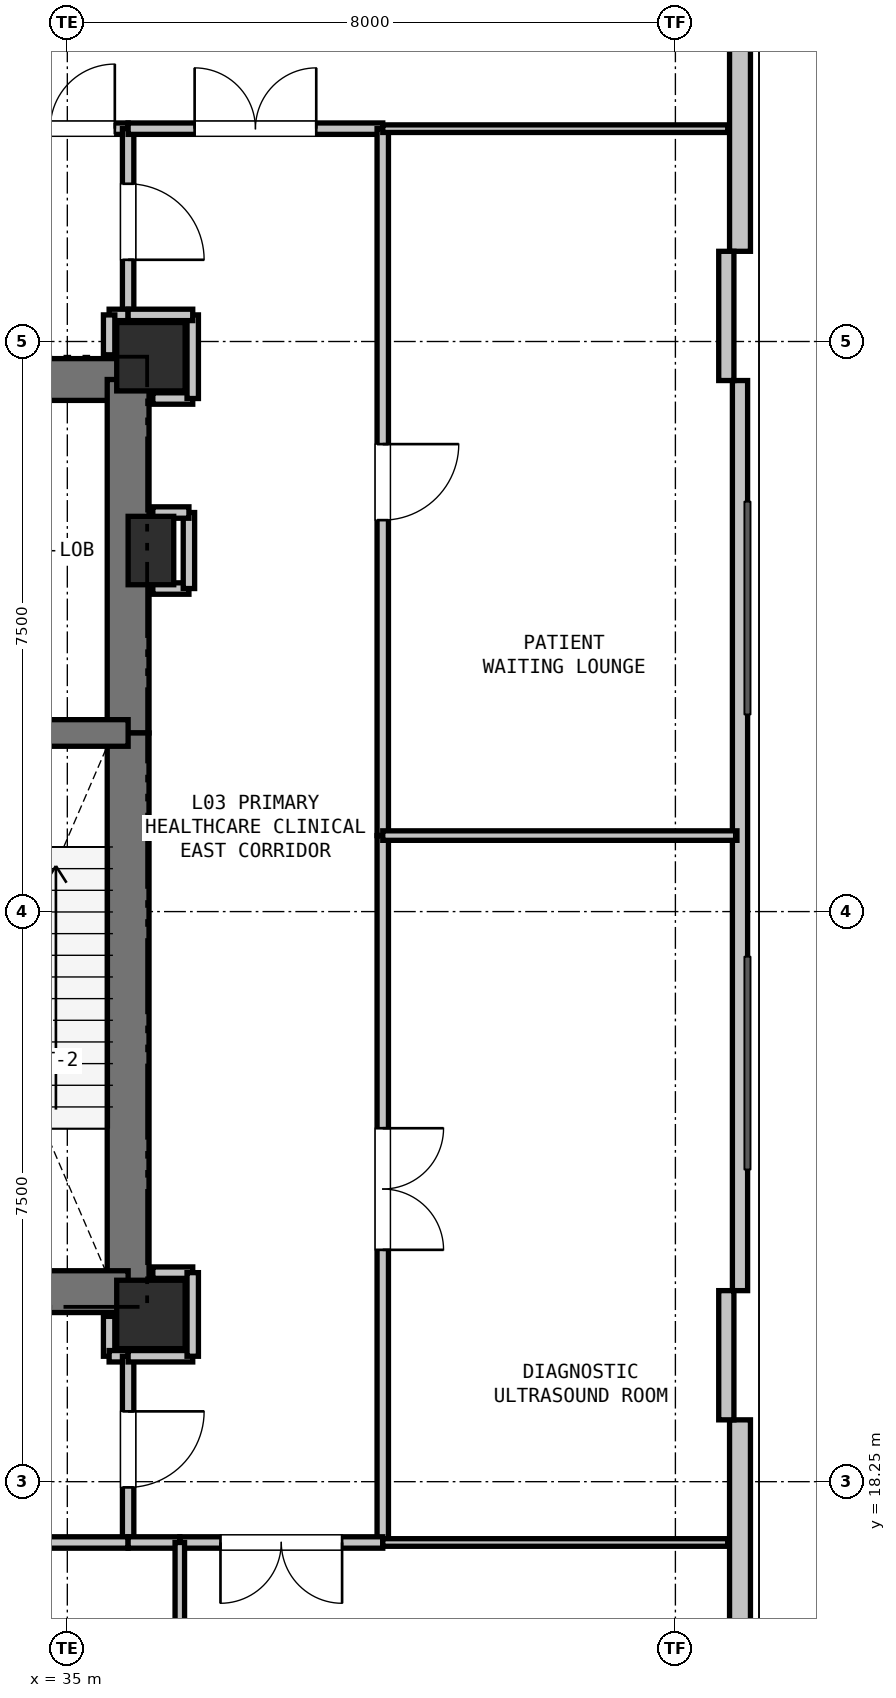
"""IFC4 building model, lengths in metres.
Left out: names, types, materials, properties, quantities, classifications, styles, units other than length and angle.
Written with IfcOpenShell. Run it as: python <this file> out.ifc"""

import sys

from ifc_helpers import new_model, si_unit, direction, frame, frame_2d, origin, origin_2d, place, context, subcontext, project, spatial, rectangle, extrude, element, fill, save


model = new_model("IFC4")
c1 = context("Model", 3, precision=1e-05, world=origin(), true_north=direction((0.0, 1.0)))
c2 = subcontext(c1, "Body", "Model", "MODEL_VIEW")
j1 = project(units=[si_unit("LENGTHUNIT", "METRE"), si_unit("PLANEANGLEUNIT", "RADIAN")], contexts=[c1])
p1 = place(None, origin())
s1 = spatial("IfcSite", under=j1, at=p1, CompositionType="ELEMENT")
p2 = place(p1, origin())
s2 = spatial("IfcBuilding", under=s1, at=p2, CompositionType="ELEMENT")
p3 = place(p2, frame((0.0, 0.0, 14.4)))
s3 = spatial("IfcBuildingStorey", under=s2, at=p3, CompositionType="ELEMENT", Elevation=14.4)
for number, where, z_axis, x_axis in (
    (1, (36.1, 33.05, 0.0), (0.0, 0.0, 1.0), (1.0, 0.0, 0.0)),
    (2, (36.1, 20.45, 0.0), (0.0, 0.0, 1.0), (1.0, 0.0, 0.0)),
):
    element("IfcColumn", number, at=place(p3, frame(where, z_axis=z_axis, x_axis=x_axis)), inside=s3, PredefinedType="COLUMN", context=c2, shape_type="SweptSolid", body=[
        extrude(rectangle(XDim=0.9, YDim=0.9, at=origin_2d()), origin(), (0.0, 0.0, 1.0), 4.8),
    ])
p4 = place(p3, frame((36.1, 30.5, 0.0), z_axis=(0.0, 0.0, 1.0), x_axis=(1.0, 0.0, 0.0)))
e3 = element("IfcColumn", 3, at=p4, inside=s3, PredefinedType="PILASTER", context=c2, shape_type="SweptSolid", body=[
    extrude(rectangle(XDim=0.6, YDim=0.9, at=origin_2d()), origin(), (0.0, 0.0, 1.0), 4.8),
])
p5 = place(p3, frame((43.85, 47.11, 0.0), z_axis=(0.0, 0.0, 1.0), x_axis=(0.0, -1.0, 0.0)))
e4 = element("IfcWall", 4, at=p5, inside=s3, PredefinedType="SOLIDWALL", context=c2, shape_type="SweptSolid", body=[
    extrude(rectangle(XDim=12.673, YDim=0.275, at=frame_2d((6.336, 0.0))), origin(), (0.0, 0.0, 1.0), 4.14),
])
p6 = place(p5, frame((3.1, 0.0, 0.9)))
e5 = element("IfcOpeningElement", 5, at=p6, cuts=e4, PredefinedType="OPENING", context=c2, shape_type="SweptSolid", body=[
    extrude(rectangle(XDim=1.6, YDim=1.8, at=frame_2d((0.8, 0.9))), frame((0.0, 0.147, 0.0), z_axis=(0.0, -1.0, 0.0), x_axis=(1.0, 0.0, 0.0)), (0.0, 0.0, 1.0), 0.295),
])
p7 = place(p3, frame((43.85, 32.737, 0.0), z_axis=(0.0, 0.0, 1.0), x_axis=(0.0, -1.0, 0.0)))
e6 = element("IfcWall", 6, at=p7, inside=s3, PredefinedType="PARAPET", context=c2, shape_type="SweptSolid", body=[
    extrude(rectangle(XDim=11.973, YDim=0.2, at=frame_2d((5.987, 0.0))), origin(), (0.0, 0.0, 1.0), 0.2),
])
p8 = place(p3, frame((43.85, 19.063, 0.0), z_axis=(0.0, 0.0, 1.0), x_axis=(0.0, -1.0, 0.0)))
e7 = element("IfcWall", 7, at=p8, inside=s3, PredefinedType="SOLIDWALL", context=c2, shape_type="SweptSolid", body=[
    extrude(rectangle(XDim=12.673, YDim=0.275, at=frame_2d((6.336, 0.0))), origin(), (0.0, 0.0, 1.0), 4.14),
])
p9 = place(p8, frame((2.988, 0.0, 0.9)))
e8 = element("IfcOpeningElement", 8, at=p9, cuts=e7, PredefinedType="OPENING", context=c2, shape_type="SweptSolid", body=[
    extrude(rectangle(XDim=2.0, YDim=1.8, at=frame_2d((1.0, 0.9))), frame((0.0, 0.147, 0.0), z_axis=(0.0, -1.0, 0.0), x_axis=(1.0, 0.0, 0.0)), (0.0, 0.0, 1.0), 0.295),
])
for number, where, z_axis, x_axis in (
    (9, (43.67, 34.437, 0.0), (0.0, 0.0, 1.0), (0.0, -1.0, 0.0)),
    (10, (43.67, 20.763, 0.0), (0.0, 0.0, 1.0), (0.0, -1.0, 0.0)),
):
    element("IfcWall", number, at=place(p3, frame(where, z_axis=z_axis, x_axis=x_axis)), inside=s3, PredefinedType="PARAPET", context=c2, shape_type="SweptSolid", body=[
        extrude(rectangle(XDim=1.7, YDim=0.2, at=frame_2d((0.85, 0.0))), origin(), (0.0, 0.0, 1.0), 4.14),
    ])
p10 = place(p3, frame((32.35, 32.75, 0.0), z_axis=(0.0, 0.0, 1.0), x_axis=(1.0, 0.0, 0.0)))
e11 = element("IfcWall", 11, at=p10, inside=s3, PredefinedType="SHEAR", context=c2, shape_type="SweptSolid", body=[
    extrude(rectangle(XDim=3.45, YDim=0.55, at=frame_2d((1.725, 0.0))), origin(), (0.0, 0.0, 1.0), 4.52),
])
p11 = place(p10, frame((0.65, 0.0, 0.0)))
e12 = element("IfcOpeningElement", 12, at=p11, cuts=e11, PredefinedType="OPENING", context=c2, shape_type="SweptSolid", body=[
    extrude(rectangle(XDim=1.15, YDim=2.15, at=frame_2d((0.575, 1.075))), frame((0.0, 0.285, 0.0), z_axis=(0.0, -1.0, 0.0), x_axis=(1.0, 0.0, 0.0)), (0.0, 0.0, 1.0), 0.57),
])
p12 = place(p3, frame((35.8, 32.75, 0.0), z_axis=(0.0, 0.0, 1.0), x_axis=(0.0, -1.0, 0.0)))
e13 = element("IfcWall", 13, at=p12, inside=s3, PredefinedType="SHEAR", context=c2, shape_type="SweptSolid", body=[
    extrude(rectangle(XDim=4.65, YDim=0.55, at=frame_2d((2.325, 0.0))), origin(), (0.0, 0.0, 1.0), 4.52),
])
p13 = place(p3, frame((35.8, 28.1, 0.0), z_axis=(0.0, 0.0, 1.0), x_axis=(0.0, -1.0, 0.0)))
e14 = element("IfcWall", 14, at=p13, inside=s3, PredefinedType="SHEAR", context=c2, shape_type="SweptSolid", body=[
    extrude(rectangle(XDim=7.35, YDim=0.55, at=frame_2d((3.675, 0.0))), origin(), (0.0, 0.0, 1.0), 4.52),
])
p14 = place(p3, frame((35.8, 20.75, 0.0), z_axis=(0.0, 0.0, 1.0), x_axis=(-1.0, 0.0, 0.0)))
e15 = element("IfcWall", 15, at=p14, inside=s3, PredefinedType="SHEAR", context=c2, shape_type="SweptSolid", body=[
    extrude(rectangle(XDim=3.45, YDim=0.55, at=frame_2d((1.725, 0.0))), origin(), (0.0, 0.0, 1.0), 4.52),
])
p15 = place(p3, frame((32.35, 28.1, 0.0), z_axis=(0.0, 0.0, 1.0), x_axis=(1.0, 0.0, 0.0)))
e16 = element("IfcWall", 16, at=p15, inside=s3, PredefinedType="SHEAR", context=c2, shape_type="SweptSolid", body=[
    extrude(rectangle(XDim=3.45, YDim=0.35, at=frame_2d((1.725, 0.0))), origin(), (0.0, 0.0, 1.0), 4.52),
])
p16 = place(p15, frame((1.15, 0.0, 0.0)))
e17 = element("IfcOpeningElement", 17, at=p16, cuts=e16, PredefinedType="OPENING", context=c2, shape_type="SweptSolid", body=[
    extrude(rectangle(XDim=1.15, YDim=2.15, at=frame_2d((0.575, 1.075))), frame((0.0, 0.185, 0.0), z_axis=(0.0, -1.0, 0.0), x_axis=(1.0, 0.0, 0.0)), (0.0, 0.0, 1.0), 0.37),
])
p17 = place(p3, frame((35.55, 20.425, 0.0), z_axis=(0.0, 0.0, 1.0), x_axis=(0.0, -1.0, 0.0)))
e18 = element("IfcWall", 18, at=p17, inside=s3, PredefinedType="PARTITIONING", context=c2, shape_type="SweptSolid", body=[
    extrude(rectangle(XDim=0.525, YDim=0.15, at=frame_2d((0.263, 0.0))), origin(), (0.0, 0.0, 1.0), 3.969),
])
p18 = place(p3, frame((35.55, 19.9, 0.0), z_axis=(0.0, 0.0, 1.0), x_axis=(1.0, 0.0, 0.0)))
e19 = element("IfcWall", 19, at=p18, inside=s3, PredefinedType="PARTITIONING", context=c2, shape_type="SweptSolid", body=[
    extrude(rectangle(XDim=0.25, YDim=0.15, at=frame_2d((0.125, 0.0))), origin(), (0.0, 0.0, 1.0), 4.52),
])
p19 = place(p3, frame((35.8, 19.9, 0.0), z_axis=(0.0, 0.0, 1.0), x_axis=(0.0, -1.0, 0.0)))
e20 = element("IfcWall", 20, at=p19, inside=s3, PredefinedType="PARTITIONING", context=c2, shape_type="SweptSolid", body=[
    extrude(rectangle(XDim=2.45, YDim=0.15, at=frame_2d((1.225, 0.0))), origin(), (0.0, 0.0, 1.0), 4.52),
])
p20 = place(p19, frame((0.725, 0.0, 0.0)))
e21 = element("IfcOpeningElement", 21, at=p20, cuts=e20, PredefinedType="OPENING", context=c2, shape_type="SweptSolid", body=[
    extrude(rectangle(XDim=1.0, YDim=2.15, at=frame_2d((0.5, 1.075))), frame((0.0, 0.085, 0.0), z_axis=(0.0, -1.0, 0.0), x_axis=(1.0, 0.0, 0.0)), (0.0, 0.0, 1.0), 0.17),
])
p21 = place(p3, frame((35.8, 17.45, 0.0), z_axis=(0.0, 0.0, 1.0), x_axis=(-1.0, 0.0, 0.0)))
e22 = element("IfcWall", 22, at=p21, inside=s3, PredefinedType="PARTITIONING", context=c2, shape_type="SweptSolid", body=[
    extrude(rectangle(XDim=6.7, YDim=0.15, at=frame_2d((3.35, 0.0))), origin(), (0.0, 0.0, 1.0), 4.52),
])
p22 = place(p21, frame((2.55, 0.0, 0.0)))
e23 = element("IfcOpeningElement", 23, at=p22, cuts=e22, PredefinedType="OPENING", context=c2, shape_type="SweptSolid", body=[
    extrude(rectangle(XDim=1.6, YDim=2.2, at=frame_2d((0.8, 1.1))), frame((0.0, 0.085, 0.0), z_axis=(0.0, -1.0, 0.0), x_axis=(1.0, 0.0, 0.0)), (0.0, 0.0, 1.0), 0.17),
])
p23 = place(p3, frame((34.6, 36.05, 0.0), z_axis=(0.0, 0.0, 1.0), x_axis=(1.0, 0.0, 0.0)))
e24 = element("IfcWall", 24, at=p23, inside=s3, PredefinedType="PARTITIONING", context=c2, shape_type="SweptSolid", body=[
    extrude(rectangle(XDim=1.2, YDim=0.15, at=frame_2d((0.6, 0.0))), origin(), (0.0, 0.0, 1.0), 4.52),
])
p24 = place(p23, frame((0.175, 0.0, 0.0)))
e25 = element("IfcOpeningElement", 25, at=p24, cuts=e24, PredefinedType="OPENING", context=c2, shape_type="SweptSolid", body=[
    extrude(rectangle(XDim=0.85, YDim=2.1, at=frame_2d((0.425, 1.05))), frame((0.0, 0.085, 0.0), z_axis=(0.0, -1.0, 0.0), x_axis=(1.0, 0.0, 0.0)), (0.0, 0.0, 1.0), 0.17),
])
p25 = place(p3, frame((35.8, 36.05, 0.0), z_axis=(0.0, 0.0, 1.0), x_axis=(0.0, -1.0, 0.0)))
e26 = element("IfcWall", 26, at=p25, inside=s3, PredefinedType="PARTITIONING", context=c2, shape_type="SweptSolid", body=[
    extrude(rectangle(XDim=2.45, YDim=0.15, at=frame_2d((1.225, 0.0))), origin(), (0.0, 0.0, 1.0), 4.52),
])
p26 = place(p25, frame((0.725, 0.0, 0.0)))
e27 = element("IfcOpeningElement", 27, at=p26, cuts=e26, PredefinedType="OPENING", context=c2, shape_type="SweptSolid", body=[
    extrude(rectangle(XDim=1.0, YDim=2.15, at=frame_2d((0.5, 1.075))), frame((0.0, 0.085, 0.0), z_axis=(0.0, -1.0, 0.0), x_axis=(1.0, 0.0, 0.0)), (0.0, 0.0, 1.0), 0.17),
])
p27 = place(p3, frame((35.8, 33.6, 0.0), z_axis=(0.0, 0.0, 1.0), x_axis=(-1.0, 0.0, 0.0)))
e28 = element("IfcWall", 28, at=p27, inside=s3, PredefinedType="PARTITIONING", context=c2, shape_type="SweptSolid", body=[
    extrude(rectangle(XDim=0.25, YDim=0.15, at=frame_2d((0.125, 0.0))), origin(), (0.0, 0.0, 1.0), 4.52),
])
p28 = place(p3, frame((35.55, 33.6, 0.0), z_axis=(0.0, 0.0, 1.0), x_axis=(0.0, -1.0, 0.0)))
e29 = element("IfcWall", 29, at=p28, inside=s3, PredefinedType="PARTITIONING", context=c2, shape_type="SweptSolid", body=[
    extrude(rectangle(XDim=0.525, YDim=0.15, at=frame_2d((0.263, 0.0))), origin(), (0.0, 0.0, 1.0), 3.969),
])
p29 = place(p3, frame((36.65, 21.0, 0.0), z_axis=(0.0, 0.0, 1.0), x_axis=(-1.0, 0.0, 0.0)))
e30 = element("IfcWall", 30, at=p29, inside=s3, PredefinedType="PARTITIONING", context=c2, shape_type="SweptSolid", body=[
    extrude(rectangle(XDim=0.525, YDim=0.15, at=frame_2d((0.262, 0.0))), origin(), (0.0, 0.0, 1.0), 3.969),
])
p30 = place(p3, frame((36.125, 30.0, 0.0), z_axis=(0.0, 0.0, 1.0), x_axis=(1.0, 0.0, 0.0)))
e31 = element("IfcWall", 31, at=p30, inside=s3, PredefinedType="PARTITIONING", context=c2, shape_type="SweptSolid", body=[
    extrude(rectangle(XDim=0.475, YDim=0.15, at=frame_2d((0.238, 0.0))), origin(), (0.0, 0.0, 1.0), 3.969),
])
p31 = place(p3, frame((36.6, 30.0, 0.0), z_axis=(0.0, 0.0, 1.0), x_axis=(0.0, 1.0, 0.0)))
e32 = element("IfcWall", 32, at=p31, inside=s3, PredefinedType="PARTITIONING", context=c2, shape_type="SweptSolid", body=[
    extrude(rectangle(XDim=1.0, YDim=0.15, at=frame_2d((0.5, 0.0))), origin(), (0.0, 0.0, 1.0), 4.52),
])
p32 = place(p3, frame((36.6, 31.0, 0.0), z_axis=(0.0, 0.0, 1.0), x_axis=(-1.0, 0.0, 0.0)))
e33 = element("IfcWall", 33, at=p32, inside=s3, PredefinedType="PARTITIONING", context=c2, shape_type="SweptSolid", body=[
    extrude(rectangle(XDim=0.475, YDim=0.15, at=frame_2d((0.238, 0.0))), origin(), (0.0, 0.0, 1.0), 3.969),
])
p33 = place(p3, frame((36.125, 32.5, 0.0), z_axis=(0.0, 0.0, 1.0), x_axis=(1.0, 0.0, 0.0)))
e34 = element("IfcWall", 34, at=p33, inside=s3, PredefinedType="PARTITIONING", context=c2, shape_type="SweptSolid", body=[
    extrude(rectangle(XDim=0.525, YDim=0.15, at=frame_2d((0.262, 0.0))), origin(), (0.0, 0.0, 1.0), 3.969),
])
p34 = place(p3, frame((36.65, 32.5, 0.0), z_axis=(0.0, 0.0, 1.0), x_axis=(0.0, 1.0, 0.0)))
e35 = element("IfcWall", 35, at=p34, inside=s3, PredefinedType="PARTITIONING", context=c2, shape_type="SweptSolid", body=[
    extrude(rectangle(XDim=1.1, YDim=0.15, at=frame_2d((0.55, 0.0))), origin(), (0.0, 0.0, 1.0), 3.818),
])
p35 = place(p3, frame((36.65, 33.6, 0.0), z_axis=(0.0, 0.0, 1.0), x_axis=(-1.0, 0.0, 0.0)))
e36 = element("IfcWall", 36, at=p35, inside=s3, PredefinedType="PARTITIONING", context=c2, shape_type="SweptSolid", body=[
    extrude(rectangle(XDim=0.85, YDim=0.15, at=frame_2d((0.425, 0.0))), origin(), (0.0, 0.0, 1.0), 3.818),
])
p36 = place(p3, frame((35.8, 36.05, 0.0), z_axis=(0.0, 0.0, 1.0), x_axis=(1.0, 0.0, 0.0)))
e37 = element("IfcWall", 37, at=p36, inside=s3, PredefinedType="PARTITIONING", context=c2, shape_type="SweptSolid", body=[
    extrude(rectangle(XDim=3.35, YDim=0.15, at=frame_2d((1.675, 0.0))), origin(), (0.0, 0.0, 1.0), 3.818),
])
p37 = place(p36, frame((0.875, 0.0, 0.0)))
e38 = element("IfcOpeningElement", 38, at=p37, cuts=e37, PredefinedType="OPENING", context=c2, shape_type="SweptSolid", body=[
    extrude(rectangle(XDim=1.6, YDim=2.2, at=frame_2d((0.8, 1.1))), frame((0.0, 0.085, 0.0), z_axis=(0.0, -1.0, 0.0), x_axis=(1.0, 0.0, 0.0)), (0.0, 0.0, 1.0), 0.17),
])
p38 = place(p3, frame((39.15, 36.05, 0.0), z_axis=(0.0, 0.0, 1.0), x_axis=(0.0, -1.0, 0.0)))
e39 = element("IfcWall", 39, at=p38, inside=s3, PredefinedType="PARTITIONING", context=c2, shape_type="SweptSolid", body=[
    extrude(rectangle(XDim=9.3, YDim=0.15, at=frame_2d((4.65, 0.0))), origin(), (0.0, 0.0, 1.0), 4.52),
])
p39 = place(p38, frame((4.15, 0.0, 0.0)))
e40 = element("IfcOpeningElement", 40, at=p39, cuts=e39, PredefinedType="OPENING", context=c2, shape_type="SweptSolid", body=[
    extrude(rectangle(XDim=1.0, YDim=2.15, at=frame_2d((0.5, 1.075))), frame((0.0, 0.085, 0.0), z_axis=(0.0, -1.0, 0.0), x_axis=(1.0, 0.0, 0.0)), (0.0, 0.0, 1.0), 0.17),
])
p40 = place(p3, frame((39.15, 26.75, 0.0), z_axis=(0.0, 0.0, 1.0), x_axis=(0.0, -1.0, 0.0)))
e41 = element("IfcWall", 41, at=p40, inside=s3, PredefinedType="PARTITIONING", context=c2, shape_type="SweptSolid", body=[
    extrude(rectangle(XDim=9.3, YDim=0.15, at=frame_2d((4.65, 0.0))), origin(), (0.0, 0.0, 1.0), 4.52),
])
p41 = place(p40, frame((3.85, 0.0, 0.0)))
e42 = element("IfcOpeningElement", 42, at=p41, cuts=e41, PredefinedType="OPENING", context=c2, shape_type="SweptSolid", body=[
    extrude(rectangle(XDim=1.6, YDim=2.2, at=frame_2d((0.8, 1.1))), frame((0.0, 0.085, 0.0), z_axis=(0.0, -1.0, 0.0), x_axis=(1.0, 0.0, 0.0)), (0.0, 0.0, 1.0), 0.17),
])
p42 = place(p3, frame((39.15, 17.45, 0.0), z_axis=(0.0, 0.0, 1.0), x_axis=(-1.0, 0.0, 0.0)))
e43 = element("IfcWall", 43, at=p42, inside=s3, PredefinedType="PARTITIONING", context=c2, shape_type="SweptSolid", body=[
    extrude(rectangle(XDim=2.67, YDim=0.15, at=frame_2d((1.335, 0.0))), origin(), (0.0, 0.0, 1.0), 3.818),
])
p43 = place(p42, frame((0.535, 0.0, 0.0)))
e44 = element("IfcOpeningElement", 44, at=p43, cuts=e43, PredefinedType="OPENING", context=c2, shape_type="SweptSolid", body=[
    extrude(rectangle(XDim=1.6, YDim=2.2, at=frame_2d((0.8, 1.1))), frame((0.0, 0.085, 0.0), z_axis=(0.0, -1.0, 0.0), x_axis=(1.0, 0.0, 0.0)), (0.0, 0.0, 1.0), 0.17),
])
p44 = place(p3, frame((36.48, 17.45, 0.0), z_axis=(0.0, 0.0, 1.0), x_axis=(-1.0, 0.0, 0.0)))
e45 = element("IfcWall", 45, at=p44, inside=s3, PredefinedType="PARTITIONING", context=c2, shape_type="SweptSolid", body=[
    extrude(rectangle(XDim=0.68, YDim=0.15, at=frame_2d((0.34, 0.0))), origin(), (0.0, 0.0, 1.0), 4.52),
])
p45 = place(p3, frame((35.8, 19.9, 0.0), z_axis=(0.0, 0.0, 1.0), x_axis=(1.0, 0.0, 0.0)))
e46 = element("IfcWall", 46, at=p45, inside=s3, PredefinedType="PARTITIONING", context=c2, shape_type="SweptSolid", body=[
    extrude(rectangle(XDim=0.85, YDim=0.15, at=frame_2d((0.425, 0.0))), origin(), (0.0, 0.0, 1.0), 3.818),
])
p46 = place(p3, frame((36.65, 19.9, 0.0), z_axis=(0.0, 0.0, 1.0), x_axis=(0.0, 1.0, 0.0)))
e47 = element("IfcWall", 47, at=p46, inside=s3, PredefinedType="PARTITIONING", context=c2, shape_type="SweptSolid", body=[
    extrude(rectangle(XDim=1.1, YDim=0.15, at=frame_2d((0.55, 0.0))), origin(), (0.0, 0.0, 1.0), 4.52),
])
p47 = place(p3, frame((43.688, 36.05, 0.0), z_axis=(0.0, 0.0, 1.0), x_axis=(-1.0, 0.0, 0.0)))
e48 = element("IfcWall", 48, at=p47, inside=s3, PredefinedType="PARTITIONING", context=c2, shape_type="SweptSolid", body=[
    extrude(rectangle(XDim=4.539, YDim=0.1, at=frame_2d((2.269, 0.0))), origin(), (0.0, 0.0, 1.0), 4.131),
])
p48 = place(p3, frame((43.81, 26.75, 0.0), z_axis=(0.0, 0.0, 1.0), x_axis=(-1.0, 0.0, 0.0)))
e49 = element("IfcWall", 49, at=p48, inside=s3, PredefinedType="PARTITIONING", context=c2, shape_type="SweptSolid", body=[
    extrude(rectangle(XDim=4.66, YDim=0.125, at=frame_2d((2.33, 0.0))), origin(), (0.0, 0.0, 1.0), 4.131),
])
p49 = place(p3, frame((43.688, 17.45, 0.0), z_axis=(0.0, 0.0, 1.0), x_axis=(-1.0, 0.0, 0.0)))
e50 = element("IfcWall", 50, at=p49, inside=s3, PredefinedType="PARTITIONING", context=c2, shape_type="SweptSolid", body=[
    extrude(rectangle(XDim=4.539, YDim=0.1, at=frame_2d((2.269, 0.0))), origin(), (0.0, 0.0, 1.0), 4.131),
])
p50 = place(p3, frame((36.48, 17.45, 0.0), z_axis=(0.0, 0.0, 1.0), x_axis=(0.0, -1.0, 0.0)))
e51 = element("IfcWall", 51, at=p50, inside=s3, PredefinedType="PARTITIONING", context=c2, shape_type="SweptSolid", body=[
    extrude(rectangle(XDim=11.979, YDim=0.125, at=frame_2d((5.99, 0.0))), origin(), (0.0, 0.0, 1.0), 4.131),
])
p51 = place(p20, origin())
e52 = element("IfcDoor", 52, at=p51, inside=s3, OperationType="SINGLE_SWING_LEFT", PredefinedType="DOOR", context=c2, shape_type="SweptSolid", body=[
    extrude(rectangle(XDim=1.0, YDim=2.15, at=frame_2d((0.5, 1.075))), frame((0.0, 0.025, 0.0), z_axis=(0.0, -1.0, 0.0), x_axis=(1.0, 0.0, 0.0)), (0.0, 0.0, 1.0), 0.05),
])
fill(e21, e52)
p52 = place(p26, origin())
e53 = element("IfcDoor", 53, at=p52, inside=s3, OperationType="SINGLE_SWING_RIGHT", PredefinedType="DOOR", context=c2, shape_type="SweptSolid", body=[
    extrude(rectangle(XDim=1.0, YDim=2.15, at=frame_2d((0.5, 1.075))), frame((0.0, 0.025, 0.0), z_axis=(0.0, -1.0, 0.0), x_axis=(1.0, 0.0, 0.0)), (0.0, 0.0, 1.0), 0.05),
])
fill(e27, e53)
p53 = place(p24, origin())
e54 = element("IfcDoor", 54, at=p53, inside=s3, OperationType="SINGLE_SWING_RIGHT", PredefinedType="DOOR", context=c2, shape_type="SweptSolid", body=[
    extrude(rectangle(XDim=0.85, YDim=2.1, at=frame_2d((0.425, 1.05))), frame((0.0, 0.025, 0.0), z_axis=(0.0, -1.0, 0.0), x_axis=(1.0, 0.0, 0.0)), (0.0, 0.0, 1.0), 0.05),
])
fill(e25, e54)
p54 = place(p37, origin())
e55 = element("IfcDoor", 55, at=p54, inside=s3, OperationType="DOUBLE_DOOR_SINGLE_SWING", PredefinedType="DOOR", context=c2, shape_type="SweptSolid", body=[
    extrude(rectangle(XDim=1.6, YDim=2.2, at=frame_2d((0.8, 1.1))), frame((0.0, 0.025, 0.0), z_axis=(0.0, -1.0, 0.0), x_axis=(1.0, 0.0, 0.0)), (0.0, 0.0, 1.0), 0.05),
])
fill(e38, e55)
p55 = place(p39, origin())
e56 = element("IfcDoor", 56, at=p55, inside=s3, OperationType="SINGLE_SWING_LEFT", PredefinedType="DOOR", context=c2, shape_type="SweptSolid", body=[
    extrude(rectangle(XDim=1.0, YDim=2.15, at=frame_2d((0.5, 1.075))), frame((0.0, 0.025, 0.0), z_axis=(0.0, -1.0, 0.0), x_axis=(1.0, 0.0, 0.0)), (0.0, 0.0, 1.0), 0.05),
])
fill(e40, e56)
p56 = place(p41, origin())
e57 = element("IfcDoor", 57, at=p56, inside=s3, OperationType="DOUBLE_DOOR_SINGLE_SWING", PredefinedType="DOOR", context=c2, shape_type="SweptSolid", body=[
    extrude(rectangle(XDim=1.6, YDim=2.2, at=frame_2d((0.8, 1.1))), frame((0.0, 0.025, 0.0), z_axis=(0.0, -1.0, 0.0), x_axis=(1.0, 0.0, 0.0)), (0.0, 0.0, 1.0), 0.05),
])
fill(e42, e57)
p57 = place(p43, origin())
e58 = element("IfcDoor", 58, at=p57, inside=s3, OperationType="DOUBLE_DOOR_SINGLE_SWING", PredefinedType="DOOR", context=c2, shape_type="SweptSolid", body=[
    extrude(rectangle(XDim=1.6, YDim=2.2, at=frame_2d((0.8, 1.1))), frame((0.0, 0.025, 0.0), z_axis=(0.0, -1.0, 0.0), x_axis=(1.0, 0.0, 0.0)), (0.0, 0.0, 1.0), 0.05),
])
fill(e44, e58)
save(model, sys.argv[1])
